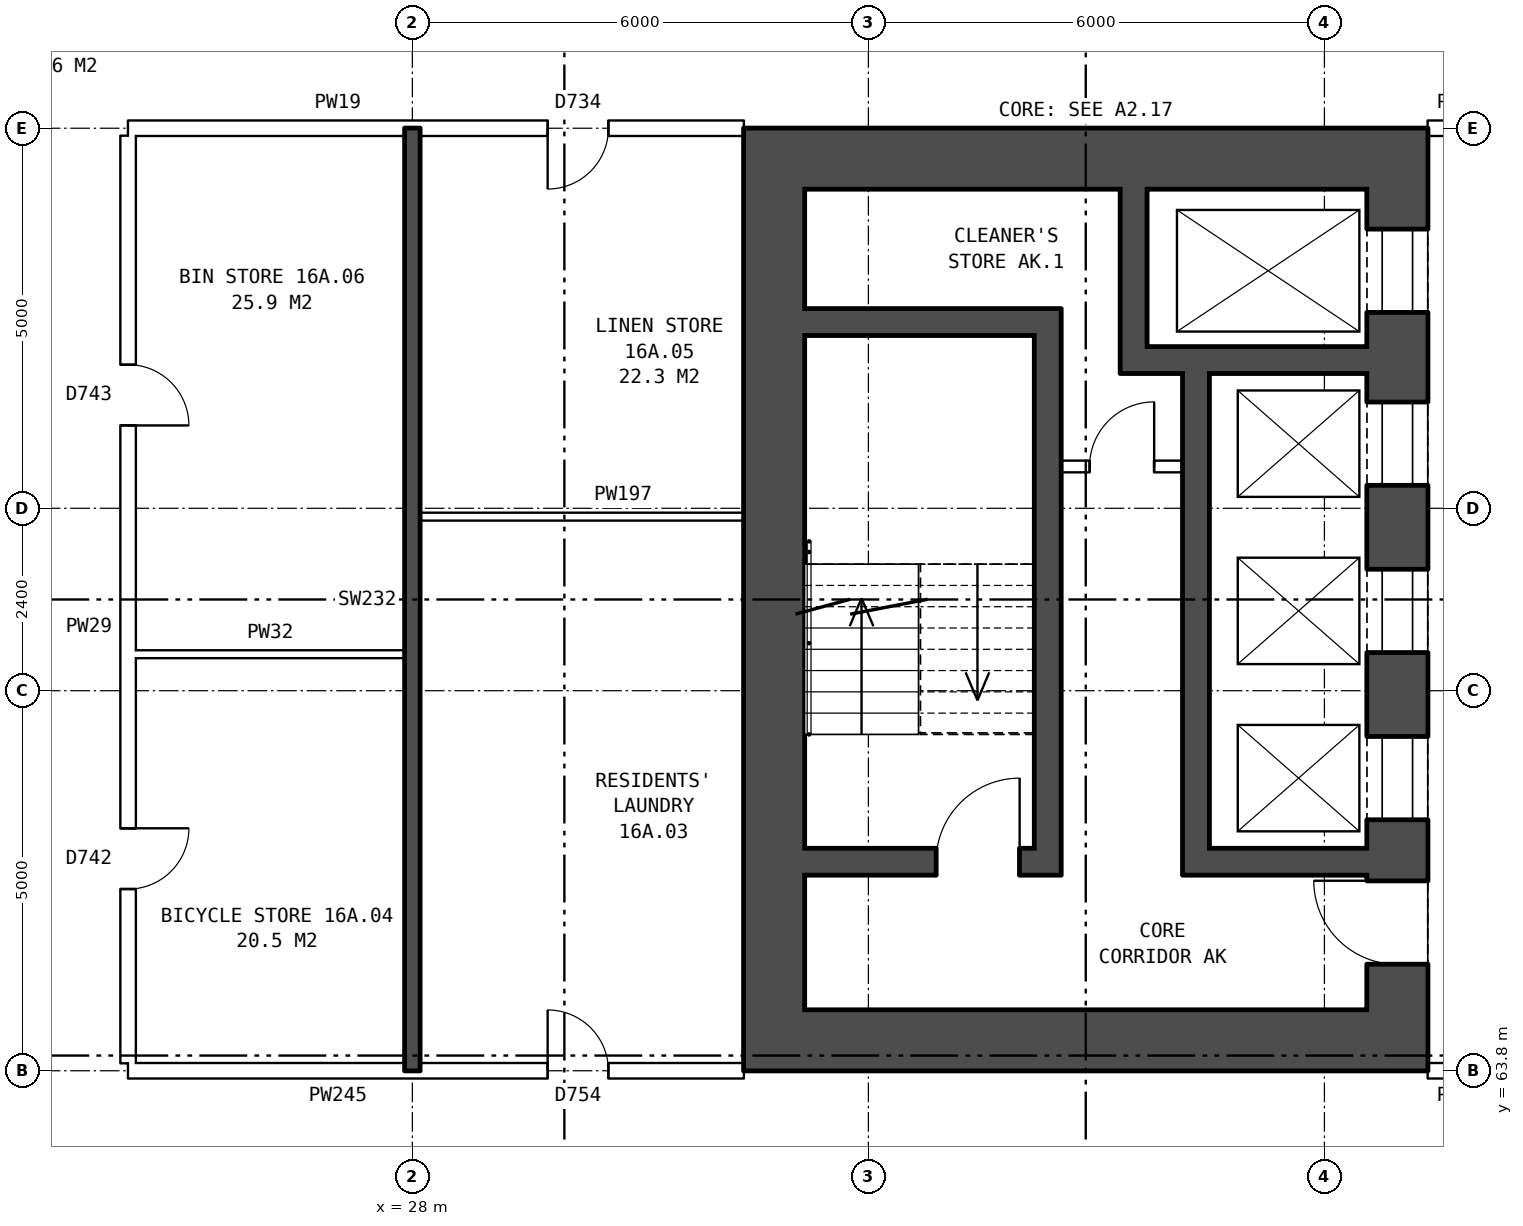
"""IFC4 building model, lengths in metres.
Left out: names, types, materials, properties, quantities, classifications, styles, units other than length and angle.
Written with IfcOpenShell. Run it as: python <this file> out.ifc"""

import sys

from ifc_helpers import new_model, si_unit, direction, frame, frame_2d, origin, place, context, subcontext, project, spatial, rectangle, extrude, element, fill, save


model = new_model("IFC4")
c1 = context("Model", 3, precision=1e-05, world=origin(), true_north=direction((0.0, 1.0)))
c2 = subcontext(c1, "Body", "Model", "MODEL_VIEW")
j1 = project(units=[si_unit("LENGTHUNIT", "METRE"), si_unit("PLANEANGLEUNIT", "RADIAN")], contexts=[c1])
p1 = place(None, origin())
s1 = spatial("IfcSite", under=j1, at=p1, CompositionType="ELEMENT")
p2 = place(p1, origin())
s2 = spatial("IfcBuilding", under=s1, at=p2, CompositionType="ELEMENT")
p3 = place(p2, frame((0.0, 0.0, 59.8)))
s3 = spatial("IfcBuildingStorey", under=s2, at=p3, CompositionType="ELEMENT", Elevation=59.8)
p4 = place(p3, frame((40.96, 75.4, 0.0), z_axis=(0.0, 0.0, 1.0), x_axis=(0.0, -1.0, 0.0)))
e1 = element("IfcWall", 1, at=p4, inside=s3, PredefinedType="SHEAR", context=c2, shape_type="SweptSolid", body=[
    extrude(rectangle(XDim=10.8, YDim=0.8, at=frame_2d((5.4, 0.0))), origin(), (0.0, 0.0, 1.0), 2.85),
])
p5 = place(p4, frame((0.525, 0.0, 0.0)))
e2 = element("IfcOpeningElement", 2, at=p5, cuts=e1, PredefinedType="OPENING", context=c2, shape_type="SweptSolid", body=[
    extrude(rectangle(XDim=1.1, YDim=2.1, at=frame_2d((0.55, 1.05))), frame((0.0, 0.41, 0.0), z_axis=(0.0, -1.0, 0.0), x_axis=(1.0, 0.0, 0.0)), (0.0, 0.0, 1.0), 0.82),
])
p6 = place(p4, frame((2.8, 0.0, 0.0)))
e3 = element("IfcOpeningElement", 3, at=p6, cuts=e1, PredefinedType="OPENING", context=c2, shape_type="SweptSolid", body=[
    extrude(rectangle(XDim=1.1, YDim=2.1, at=frame_2d((0.55, 1.05))), frame((0.0, 0.41, 0.0), z_axis=(0.0, -1.0, 0.0), x_axis=(1.0, 0.0, 0.0)), (0.0, 0.0, 1.0), 0.82),
])
p7 = place(p4, frame((5.0, 0.0, 0.0)))
e4 = element("IfcOpeningElement", 4, at=p7, cuts=e1, PredefinedType="OPENING", context=c2, shape_type="SweptSolid", body=[
    extrude(rectangle(XDim=1.1, YDim=2.1, at=frame_2d((0.55, 1.05))), frame((0.0, 0.41, 0.0), z_axis=(0.0, -1.0, 0.0), x_axis=(1.0, 0.0, 0.0)), (0.0, 0.0, 1.0), 0.82),
])
p8 = place(p4, frame((7.2, 0.0, 0.0)))
e5 = element("IfcOpeningElement", 5, at=p8, cuts=e1, PredefinedType="OPENING", context=c2, shape_type="SweptSolid", body=[
    extrude(rectangle(XDim=1.1, YDim=2.1, at=frame_2d((0.55, 1.05))), frame((0.0, 0.41, 0.0), z_axis=(0.0, -1.0, 0.0), x_axis=(1.0, 0.0, 0.0)), (0.0, 0.0, 1.0), 0.82),
])
p9 = place(p4, frame((9.1, 0.0, 0.0)))
e6 = element("IfcOpeningElement", 6, at=p9, cuts=e1, PredefinedType="OPENING", context=c2, shape_type="SweptSolid", body=[
    extrude(rectangle(XDim=1.1, YDim=2.1, at=frame_2d((0.55, 1.05))), frame((0.0, 0.41, 0.0), z_axis=(0.0, -1.0, 0.0), x_axis=(1.0, 0.0, 0.0)), (0.0, 0.0, 1.0), 0.82),
])
p10 = place(p3, frame((32.76, 75.4, 0.0), z_axis=(0.0, 0.0, 1.0), x_axis=(0.0, -1.0, 0.0)))
e7 = element("IfcWall", 7, at=p10, inside=s3, PredefinedType="SHEAR", context=c2, shape_type="SweptSolid", body=[
    extrude(rectangle(XDim=10.8, YDim=0.8, at=frame_2d((5.4, 0.0))), origin(), (0.0, 0.0, 1.0), 2.85),
])
for number, where, z_axis, x_axis in (
    (8, (41.36, 75.8, 0.0), (0.0, 0.0, 1.0), (-1.0, 0.0, 0.0)),
    (9, (41.36, 64.2, 0.0), (0.0, 0.0, 1.0), (-1.0, 0.0, 0.0)),
):
    element("IfcWall", number, at=place(p3, frame(where, z_axis=z_axis, x_axis=x_axis)), inside=s3, PredefinedType="SHEAR", context=c2, shape_type="SweptSolid", body=[
        extrude(rectangle(XDim=9.0, YDim=0.8, at=frame_2d((4.5, 0.0))), origin(), (0.0, 0.0, 1.0), 2.85),
    ])
p11 = place(p3, frame((36.185, 73.65, 0.0), z_axis=(0.0, 0.0, 1.0), x_axis=(-1.0, 0.0, 0.0)))
e10 = element("IfcWall", 10, at=p11, inside=s3, PredefinedType="SHEAR", context=c2, shape_type="SweptSolid", body=[
    extrude(rectangle(XDim=3.025, YDim=0.35, at=frame_2d((1.513, 0.0))), origin(), (0.0, 0.0, 1.0), 2.85),
])
p12 = place(p3, frame((40.56, 73.15, 0.0), z_axis=(0.0, 0.0, 1.0), x_axis=(-1.0, 0.0, 0.0)))
e11 = element("IfcWall", 11, at=p12, inside=s3, PredefinedType="SHEAR", context=c2, shape_type="SweptSolid", body=[
    extrude(rectangle(XDim=3.245, YDim=0.35, at=frame_2d((1.623, 0.0))), origin(), (0.0, 0.0, 1.0), 2.85),
])
p13 = place(p3, frame((38.135, 71.75, 0.0), z_axis=(0.0, 0.0, 1.0), x_axis=(-1.0, 0.0, 0.0)))
e12 = element("IfcWall", 12, at=p13, inside=s3, PredefinedType="PARTITIONING", context=c2, shape_type="SweptSolid", body=[
    extrude(rectangle(XDim=1.6, YDim=0.15, at=frame_2d((0.8, 0.0))), origin(), (0.0, 0.0, 1.0), 2.85),
])
p14 = place(p13, frame((0.375, 0.0, 0.0)))
e13 = element("IfcOpeningElement", 13, at=p14, cuts=e12, PredefinedType="OPENING", context=c2, shape_type="SweptSolid", body=[
    extrude(rectangle(XDim=0.85, YDim=2.1, at=frame_2d((0.425, 1.05))), frame((0.0, 0.085, 0.0), z_axis=(0.0, -1.0, 0.0), x_axis=(1.0, 0.0, 0.0)), (0.0, 0.0, 1.0), 0.17),
])
p15 = place(p3, frame((40.56, 66.55, 0.0), z_axis=(0.0, 0.0, 1.0), x_axis=(-1.0, 0.0, 0.0)))
e14 = element("IfcWall", 14, at=p15, inside=s3, PredefinedType="SHEAR", context=c2, shape_type="SweptSolid", body=[
    extrude(rectangle(XDim=2.075, YDim=0.35, at=frame_2d((1.038, 0.0))), origin(), (0.0, 0.0, 1.0), 2.85),
])
p16 = place(p3, frame((36.185, 66.55, 0.0), z_axis=(0.0, 0.0, 1.0), x_axis=(-1.0, 0.0, 0.0)))
e15 = element("IfcWall", 15, at=p16, inside=s3, PredefinedType="SHEAR", context=c2, shape_type="SweptSolid", body=[
    extrude(rectangle(XDim=3.025, YDim=0.35, at=frame_2d((1.513, 0.0))), origin(), (0.0, 0.0, 1.0), 2.85),
])
p17 = place(p16, frame((0.195, 0.0, 0.0)))
e16 = element("IfcOpeningElement", 16, at=p17, cuts=e15, PredefinedType="OPENING", context=c2, shape_type="SweptSolid", body=[
    extrude(rectangle(XDim=1.1, YDim=2.1, at=frame_2d((0.55, 1.05))), frame((0.0, 0.185, 0.0), z_axis=(0.0, -1.0, 0.0), x_axis=(1.0, 0.0, 0.0)), (0.0, 0.0, 1.0), 0.37),
])
p18 = place(p3, frame((38.31, 72.975, 0.0), z_axis=(0.0, 0.0, 1.0), x_axis=(0.0, -1.0, 0.0)))
e17 = element("IfcWall", 17, at=p18, inside=s3, PredefinedType="SHEAR", context=c2, shape_type="SweptSolid", body=[
    extrude(rectangle(XDim=6.6, YDim=0.35, at=frame_2d((3.3, 0.0))), origin(), (0.0, 0.0, 1.0), 2.85),
])
p19 = place(p3, frame((37.49, 75.4, 0.0), z_axis=(0.0, 0.0, 1.0), x_axis=(0.0, -1.0, 0.0)))
e18 = element("IfcWall", 18, at=p19, inside=s3, PredefinedType="SHEAR", context=c2, shape_type="SweptSolid", body=[
    extrude(rectangle(XDim=2.075, YDim=0.35, at=frame_2d((1.038, 0.0))), origin(), (0.0, 0.0, 1.0), 2.85),
])
p20 = place(p3, frame((36.36, 73.825, 0.0), z_axis=(0.0, 0.0, 1.0), x_axis=(0.0, -1.0, 0.0)))
e19 = element("IfcWall", 19, at=p20, inside=s3, PredefinedType="SHEAR", context=c2, shape_type="SweptSolid", body=[
    extrude(rectangle(XDim=7.45, YDim=0.35, at=frame_2d((3.725, 0.0))), origin(), (0.0, 0.0, 1.0), 2.85),
])
p21 = place(p3, frame((24.26, 63.8, 0.0), z_axis=(0.0, 0.0, 1.0), x_axis=(1.0, 0.0, 0.0)))
e20 = element("IfcWall", 20, at=p21, inside=s3, PredefinedType="PARTITIONING", context=c2, shape_type="SweptSolid", body=[
    extrude(rectangle(XDim=8.1, YDim=0.2, at=frame_2d((4.05, 0.0))), origin(), (0.0, 0.0, 1.0), 2.85),
])
p22 = place(p21, frame((5.52, 0.0, 0.0)))
e21 = element("IfcOpeningElement", 21, at=p22, cuts=e20, PredefinedType="OPENING", context=c2, shape_type="SweptSolid", body=[
    extrude(rectangle(XDim=0.8, YDim=2.1, at=frame_2d((0.4, 1.05))), frame((0.0, 0.11, 0.0), z_axis=(0.0, -1.0, 0.0), x_axis=(1.0, 0.0, 0.0)), (0.0, 0.0, 1.0), 0.22),
])
p23 = place(p3, frame((41.36, 63.8, 0.0), z_axis=(0.0, 0.0, 1.0), x_axis=(1.0, 0.0, 0.0)))
e22 = element("IfcWall", 22, at=p23, inside=s3, PredefinedType="PARTITIONING", context=c2, shape_type="SweptSolid", body=[
    extrude(rectangle(XDim=3.0, YDim=0.2, at=frame_2d((1.5, 0.0))), origin(), (0.0, 0.0, 1.0), 2.85),
])
p24 = place(p23, frame((1.0, 0.0, 0.0)))
e23 = element("IfcOpeningElement", 23, at=p24, cuts=e22, PredefinedType="OPENING", context=c2, shape_type="SweptSolid", body=[
    extrude(rectangle(XDim=1.0, YDim=2.1, at=frame_2d((0.5, 1.05))), frame((0.0, 0.11, 0.0), z_axis=(0.0, -1.0, 0.0), x_axis=(1.0, 0.0, 0.0)), (0.0, 0.0, 1.0), 0.22),
])
p25 = place(p3, frame((24.36, 69.28, 0.0), z_axis=(0.0, 0.0, 1.0), x_axis=(1.0, 0.0, 0.0)))
e24 = element("IfcWall", 24, at=p25, inside=s3, PredefinedType="PARTITIONING", context=c2, shape_type="SweptSolid", body=[
    extrude(rectangle(XDim=3.54, YDim=0.1, at=frame_2d((1.77, 0.0))), origin(), (0.0, 0.0, 1.0), 2.85),
])
p26 = place(p3, frame((28.1, 71.09, 0.0), z_axis=(0.0, 0.0, 1.0), x_axis=(1.0, 0.0, 0.0)))
e25 = element("IfcWall", 25, at=p26, inside=s3, PredefinedType="PARTITIONING", context=c2, shape_type="SweptSolid", body=[
    extrude(rectangle(XDim=4.26, YDim=0.1, at=frame_2d((2.13, 0.0))), origin(), (0.0, 0.0, 1.0), 2.85),
])
p27 = place(p3, frame((24.26, 76.2, 0.0), z_axis=(0.0, 0.0, 1.0), x_axis=(1.0, 0.0, 0.0)))
e26 = element("IfcWall", 26, at=p27, inside=s3, PredefinedType="PARTITIONING", context=c2, shape_type="SweptSolid", body=[
    extrude(rectangle(XDim=8.1, YDim=0.2, at=frame_2d((4.05, 0.0))), origin(), (0.0, 0.0, 1.0), 2.85),
])
p28 = place(p27, frame((5.52, 0.0, 0.0)))
e27 = element("IfcOpeningElement", 27, at=p28, cuts=e26, PredefinedType="OPENING", context=c2, shape_type="SweptSolid", body=[
    extrude(rectangle(XDim=0.8, YDim=2.1, at=frame_2d((0.4, 1.05))), frame((0.0, 0.11, 0.0), z_axis=(0.0, -1.0, 0.0), x_axis=(1.0, 0.0, 0.0)), (0.0, 0.0, 1.0), 0.22),
])
p29 = place(p3, frame((41.36, 76.2, 0.0), z_axis=(0.0, 0.0, 1.0), x_axis=(1.0, 0.0, 0.0)))
e28 = element("IfcWall", 28, at=p29, inside=s3, PredefinedType="PARTITIONING", context=c2, shape_type="SweptSolid", body=[
    extrude(rectangle(XDim=3.0, YDim=0.2, at=frame_2d((1.5, 0.0))), origin(), (0.0, 0.0, 1.0), 2.85),
])
p30 = place(p29, frame((1.0, 0.0, 0.0)))
e29 = element("IfcOpeningElement", 29, at=p30, cuts=e28, PredefinedType="OPENING", context=c2, shape_type="SweptSolid", body=[
    extrude(rectangle(XDim=1.0, YDim=2.1, at=frame_2d((0.5, 1.05))), frame((0.0, 0.11, 0.0), z_axis=(0.0, -1.0, 0.0), x_axis=(1.0, 0.0, 0.0)), (0.0, 0.0, 1.0), 0.22),
])
p31 = place(p3, frame((24.26, 63.9, 0.0), z_axis=(0.0, 0.0, 1.0), x_axis=(0.0, 1.0, 0.0)))
e30 = element("IfcWall", 30, at=p31, inside=s3, PredefinedType="PARTITIONING", context=c2, shape_type="SweptSolid", body=[
    extrude(rectangle(XDim=12.2, YDim=0.2, at=frame_2d((6.1, 0.0))), origin(), (0.0, 0.0, 1.0), 2.85),
])
p32 = place(p31, frame((2.29, 0.0, 0.0)))
e31 = element("IfcOpeningElement", 31, at=p32, cuts=e30, PredefinedType="OPENING", context=c2, shape_type="SweptSolid", body=[
    extrude(rectangle(XDim=0.8, YDim=2.1, at=frame_2d((0.4, 1.05))), frame((0.0, 0.11, 0.0), z_axis=(0.0, -1.0, 0.0), x_axis=(1.0, 0.0, 0.0)), (0.0, 0.0, 1.0), 0.22),
])
p33 = place(p31, frame((8.39, 0.0, 0.0)))
e32 = element("IfcOpeningElement", 32, at=p33, cuts=e30, PredefinedType="OPENING", context=c2, shape_type="SweptSolid", body=[
    extrude(rectangle(XDim=0.8, YDim=2.1, at=frame_2d((0.4, 1.05))), frame((0.0, 0.11, 0.0), z_axis=(0.0, -1.0, 0.0), x_axis=(1.0, 0.0, 0.0)), (0.0, 0.0, 1.0), 0.22),
])
p34 = place(p3, frame((28.0, 63.8, 0.0), z_axis=(0.0, 0.0, 1.0), x_axis=(0.0, 1.0, 0.0)))
e33 = element("IfcWall", 33, at=p34, inside=s3, PredefinedType="SOLIDWALL", context=c2, shape_type="SweptSolid", body=[
    extrude(rectangle(XDim=12.4, YDim=0.2, at=frame_2d((6.2, 0.0))), origin(), (0.0, 0.0, 1.0), 2.85),
])
p35 = place(p5, origin())
e34 = element("IfcDoor", 34, at=p35, inside=s3, OperationType="DOUBLE_DOOR_SLIDING", PredefinedType="DOOR", context=c2, shape_type="SweptSolid", body=[
    extrude(rectangle(XDim=1.1, YDim=2.1, at=frame_2d((0.55, 1.05))), frame((0.0, -0.335, 0.0), z_axis=(0.0, -1.0, 0.0), x_axis=(1.0, 0.0, 0.0)), (0.0, 0.0, 1.0), 0.05),
])
fill(e2, e34)
p36 = place(p6, origin())
e35 = element("IfcDoor", 35, at=p36, inside=s3, OperationType="DOUBLE_DOOR_SLIDING", PredefinedType="DOOR", context=c2, shape_type="SweptSolid", body=[
    extrude(rectangle(XDim=1.1, YDim=2.1, at=frame_2d((0.55, 1.05))), frame((0.0, -0.335, 0.0), z_axis=(0.0, -1.0, 0.0), x_axis=(1.0, 0.0, 0.0)), (0.0, 0.0, 1.0), 0.05),
])
fill(e3, e35)
p37 = place(p7, origin())
e36 = element("IfcDoor", 36, at=p37, inside=s3, OperationType="DOUBLE_DOOR_SLIDING", PredefinedType="DOOR", context=c2, shape_type="SweptSolid", body=[
    extrude(rectangle(XDim=1.1, YDim=2.1, at=frame_2d((0.55, 1.05))), frame((0.0, -0.335, 0.0), z_axis=(0.0, -1.0, 0.0), x_axis=(1.0, 0.0, 0.0)), (0.0, 0.0, 1.0), 0.05),
])
fill(e4, e36)
p38 = place(p8, origin())
e37 = element("IfcDoor", 37, at=p38, inside=s3, OperationType="DOUBLE_DOOR_SLIDING", PredefinedType="DOOR", context=c2, shape_type="SweptSolid", body=[
    extrude(rectangle(XDim=1.1, YDim=2.1, at=frame_2d((0.55, 1.05))), frame((0.0, -0.335, 0.0), z_axis=(0.0, -1.0, 0.0), x_axis=(1.0, 0.0, 0.0)), (0.0, 0.0, 1.0), 0.05),
])
fill(e5, e37)
p39 = place(p9, frame((1.1, 0.0, 0.0), z_axis=(0.0, 0.0, 1.0), x_axis=(-1.0, 0.0, 0.0)))
e38 = element("IfcDoor", 38, at=p39, inside=s3, OperationType="SINGLE_SWING_RIGHT", PredefinedType="DOOR", context=c2, shape_type="SweptSolid", body=[
    extrude(rectangle(XDim=1.1, YDim=2.1, at=frame_2d((0.55, 1.05))), frame((0.0, 0.385, 0.0), z_axis=(0.0, -1.0, 0.0), x_axis=(1.0, 0.0, 0.0)), (0.0, 0.0, 1.0), 0.05),
])
fill(e6, e38)
p40 = place(p17, frame((1.1, 0.0, 0.0), z_axis=(0.0, 0.0, 1.0), x_axis=(-1.0, 0.0, 0.0)))
e39 = element("IfcDoor", 39, at=p40, inside=s3, OperationType="SINGLE_SWING_RIGHT", PredefinedType="DOOR", context=c2, shape_type="SweptSolid", body=[
    extrude(rectangle(XDim=1.1, YDim=2.1, at=frame_2d((0.55, 1.05))), frame((0.0, 0.025, 0.0), z_axis=(0.0, -1.0, 0.0), x_axis=(1.0, 0.0, 0.0)), (0.0, 0.0, 1.0), 0.05),
])
fill(e16, e39)
p41 = place(p14, frame((0.85, 0.0, 0.0), z_axis=(0.0, 0.0, 1.0), x_axis=(-1.0, 0.0, 0.0)))
e40 = element("IfcDoor", 40, at=p41, inside=s3, OperationType="SINGLE_SWING_RIGHT", PredefinedType="DOOR", context=c2, shape_type="SweptSolid", body=[
    extrude(rectangle(XDim=0.85, YDim=2.1, at=frame_2d((0.425, 1.05))), frame((0.0, 0.025, 0.0), z_axis=(0.0, -1.0, 0.0), x_axis=(1.0, 0.0, 0.0)), (0.0, 0.0, 1.0), 0.05),
])
fill(e13, e40)
p42 = place(p22, origin())
e41 = element("IfcDoor", 41, at=p42, inside=s3, OperationType="SINGLE_SWING_LEFT", PredefinedType="DOOR", context=c2, shape_type="SweptSolid", body=[
    extrude(rectangle(XDim=0.8, YDim=2.1, at=frame_2d((0.4, 1.05))), frame((0.0, 0.025, 0.0), z_axis=(0.0, -1.0, 0.0), x_axis=(1.0, 0.0, 0.0)), (0.0, 0.0, 1.0), 0.05),
])
fill(e21, e41)
p43 = place(p32, frame((0.8, 0.0, 0.0), z_axis=(0.0, 0.0, 1.0), x_axis=(-1.0, 0.0, 0.0)))
e42 = element("IfcDoor", 42, at=p43, inside=s3, OperationType="SINGLE_SWING_LEFT", PredefinedType="DOOR", context=c2, shape_type="SweptSolid", body=[
    extrude(rectangle(XDim=0.8, YDim=2.1, at=frame_2d((0.4, 1.05))), frame((0.0, 0.025, 0.0), z_axis=(0.0, -1.0, 0.0), x_axis=(1.0, 0.0, 0.0)), (0.0, 0.0, 1.0), 0.05),
])
fill(e31, e42)
p44 = place(p28, frame((0.8, 0.0, 0.0), z_axis=(0.0, 0.0, 1.0), x_axis=(-1.0, 0.0, 0.0)))
e43 = element("IfcDoor", 43, at=p44, inside=s3, OperationType="SINGLE_SWING_RIGHT", PredefinedType="DOOR", context=c2, shape_type="SweptSolid", body=[
    extrude(rectangle(XDim=0.8, YDim=2.1, at=frame_2d((0.4, 1.05))), frame((0.0, 0.025, 0.0), z_axis=(0.0, -1.0, 0.0), x_axis=(1.0, 0.0, 0.0)), (0.0, 0.0, 1.0), 0.05),
])
fill(e27, e43)
p45 = place(p33, frame((0.8, 0.0, 0.0), z_axis=(0.0, 0.0, 1.0), x_axis=(-1.0, 0.0, 0.0)))
e44 = element("IfcDoor", 44, at=p45, inside=s3, OperationType="SINGLE_SWING_RIGHT", PredefinedType="DOOR", context=c2, shape_type="SweptSolid", body=[
    extrude(rectangle(XDim=0.8, YDim=2.1, at=frame_2d((0.4, 1.05))), frame((0.0, 0.025, 0.0), z_axis=(0.0, -1.0, 0.0), x_axis=(1.0, 0.0, 0.0)), (0.0, 0.0, 1.0), 0.05),
])
fill(e32, e44)
save(model, sys.argv[1])
